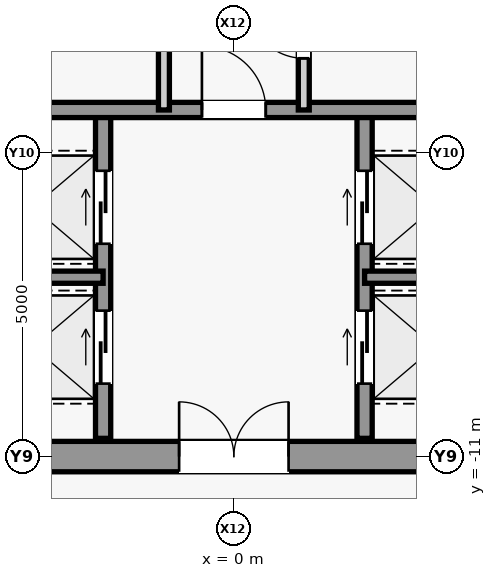
"""IFC4 building model, lengths in metres.
Left out: names, types, materials, properties, quantities, classifications, styles, units other than length and angle.
Written with IfcOpenShell. Run it as: python <this file> out.ifc"""

import sys

from ifc_helpers import new_model, si_unit, direction, frame, frame_2d, origin, place, context, subcontext, project, spatial, rectangle, extrude, source, transform, mapped, element, fill, save


model = new_model("IFC4")
c1 = context("Model", 3, precision=1e-05, world=origin(), true_north=direction((0.0, 1.0)))
c2 = subcontext(c1, "Body", "Model", "MODEL_VIEW")
j1 = project(units=[si_unit("LENGTHUNIT", "METRE"), si_unit("PLANEANGLEUNIT", "RADIAN")], contexts=[c1])
p1 = place(None, origin())
s1 = spatial("IfcSite", under=j1, at=p1, CompositionType="ELEMENT")
p2 = place(p1, origin())
s2 = spatial("IfcBuilding", under=s1, at=p2, CompositionType="ELEMENT")
p3 = place(p2, frame((0.0, 0.0, 116.0)))
s3 = spatial("IfcBuildingStorey", under=s2, at=p3, CompositionType="ELEMENT", Elevation=116.0)
m1 = source(origin(), c2, "Body", "SweptSolid", [
    extrude(rectangle(XDim=9.2, YDim=0.5, at=frame_2d((4.6, 0.0))), origin(), (0.0, 0.0, 1.0), 3.84),
])
p4 = place(p3, frame((-4.6, -11.0, 0.0), z_axis=(0.0, 0.0, 1.0), x_axis=(1.0, 0.0, 0.0)))
e1 = element("IfcWall", 1, at=p4, inside=s3, PredefinedType="SHEAR", context=c2, shape_type="MappedRepresentation", body=[
    mapped(m1, transform((0.0, 0.0, 0.0), scale=1.0)),
])
m2 = source(origin(), c2, "Body", "SweptSolid", [
    extrude(rectangle(XDim=1.8, YDim=2.25, at=frame_2d((0.9, 1.125))), frame((0.0, 0.26, 0.0), z_axis=(0.0, -1.0, 0.0), x_axis=(1.0, 0.0, 0.0)), (0.0, 0.0, 1.0), 0.52),
])
p5 = place(p4, frame((3.7, 0.0, 0.0)))
e2 = element("IfcOpeningElement", 2, at=p5, cuts=e1, PredefinedType="OPENING", context=c2, shape_type="MappedRepresentation", body=[
    mapped(m2, transform((0.0, 0.0, 0.0), scale=1.0)),
])
m3 = source(origin(), c2, "Body", "SweptSolid", [
    extrude(rectangle(XDim=5.4, YDim=0.25, at=frame_2d((2.7, 0.0))), origin(), (0.0, 0.0, 1.0), 3.84),
])
p6 = place(p3, frame((-2.15, -10.7, 0.0), z_axis=(0.0, 0.0, 1.0), x_axis=(0.0, 1.0, 0.0)))
e3 = element("IfcWall", 3, at=p6, inside=s3, PredefinedType="SHEAR", context=c2, shape_type="MappedRepresentation", body=[
    mapped(m3, transform((0.0, 0.0, 0.0), scale=1.0)),
])
m4 = source(origin(), c2, "Body", "SweptSolid", [
    extrude(rectangle(XDim=1.2, YDim=2.3, at=frame_2d((0.6, 1.15))), frame((0.0, 0.135, 0.0), z_axis=(0.0, -1.0, 0.0), x_axis=(1.0, 0.0, 0.0)), (0.0, 0.0, 1.0), 0.27),
])
p7 = place(p6, frame((0.9, 0.0, 0.0)))
e4 = element("IfcOpeningElement", 4, at=p7, cuts=e3, PredefinedType="OPENING", context=c2, shape_type="MappedRepresentation", body=[
    mapped(m4, transform((0.0, 0.0, 0.0), scale=1.0)),
])
p8 = place(p6, frame((3.2, 0.0, 0.0)))
e5 = element("IfcOpeningElement", 5, at=p8, cuts=e3, PredefinedType="OPENING", context=c2, shape_type="MappedRepresentation", body=[
    mapped(m4, transform((0.0, 0.0, 0.0), scale=1.0)),
])
p9 = place(p3, frame((2.15, -10.7, 0.0), z_axis=(0.0, 0.0, 1.0), x_axis=(0.0, 1.0, 0.0)))
e6 = element("IfcWall", 6, at=p9, inside=s3, PredefinedType="SHEAR", context=c2, shape_type="MappedRepresentation", body=[
    mapped(m3, transform((0.0, 0.0, 0.0), scale=1.0)),
])
p10 = place(p9, frame((0.9, 0.0, 0.0)))
e7 = element("IfcOpeningElement", 7, at=p10, cuts=e6, PredefinedType="OPENING", context=c2, shape_type="MappedRepresentation", body=[
    mapped(m4, transform((0.0, 0.0, 0.0), scale=1.0)),
])
p11 = place(p9, frame((3.2, 0.0, 0.0)))
e8 = element("IfcOpeningElement", 8, at=p11, cuts=e6, PredefinedType="OPENING", context=c2, shape_type="MappedRepresentation", body=[
    mapped(m4, transform((0.0, 0.0, 0.0), scale=1.0)),
])
m5 = source(origin(), c2, "Body", "SweptSolid", [
    extrude(rectangle(XDim=2.45, YDim=0.2, at=frame_2d((1.225, 0.0))), origin(), (0.0, 0.0, 1.0), 3.84),
])
for number, where, z_axis, x_axis in (
    (9, (-4.6, -8.05, 0.0), (0.0, 0.0, 1.0), (1.0, 0.0, 0.0)),
    (10, (2.15, -8.05, 0.0), (0.0, 0.0, 1.0), (1.0, 0.0, 0.0)),
):
    element("IfcWall", number, at=place(p3, frame(where, z_axis=z_axis, x_axis=x_axis)), inside=s3, PredefinedType="SHEAR", context=c2, shape_type="MappedRepresentation", body=[
        mapped(m5, transform((0.0, 0.0, 0.0), scale=1.0)),
    ])
m6 = source(origin(), c2, "Body", "SweptSolid", [
    extrude(rectangle(XDim=9.2, YDim=0.25, at=frame_2d((4.6, 0.0))), origin(), (0.0, 0.0, 1.0), 3.84),
])
p12 = place(p3, frame((-4.6, -5.3, 0.0), z_axis=(0.0, 0.0, 1.0), x_axis=(1.0, 0.0, 0.0)))
e11 = element("IfcWall", 11, at=p12, inside=s3, PredefinedType="SHEAR", context=c2, shape_type="MappedRepresentation", body=[
    mapped(m6, transform((0.0, 0.0, 0.0), scale=1.0)),
])
m7 = source(origin(), c2, "Body", "SweptSolid", [
    extrude(rectangle(XDim=1.05, YDim=2.2, at=frame_2d((0.525, 1.1))), frame((0.0, 0.135, 0.0), z_axis=(0.0, -1.0, 0.0), x_axis=(1.0, 0.0, 0.0)), (0.0, 0.0, 1.0), 0.27),
])
p13 = place(p12, frame((4.075, 0.0, 0.0)))
e12 = element("IfcOpeningElement", 12, at=p13, cuts=e11, PredefinedType="OPENING", context=c2, shape_type="MappedRepresentation", body=[
    mapped(m7, transform((0.0, 0.0, 0.0), scale=1.0)),
])
m8 = source(origin(), c2, "Body", "SweptSolid", [
    extrude(rectangle(XDim=10.6, YDim=0.18, at=frame_2d((5.3, 0.0))), origin(), (0.0, 0.0, 1.0), 3.84),
])
p14 = place(p3, frame((-1.15, -5.3, 0.0), z_axis=(0.0, 0.0, 1.0), x_axis=(0.0, 1.0, 0.0)))
e13 = element("IfcWall", 13, at=p14, inside=s3, PredefinedType="PARTITIONING", context=c2, shape_type="MappedRepresentation", body=[
    mapped(m8, transform((0.0, 0.0, 0.0), scale=1.0)),
])
m9 = source(origin(), c2, "Body", "SweptSolid", [
    extrude(rectangle(XDim=0.9, YDim=2.15, at=frame_2d((0.45, 1.075))), frame((0.0, 0.1, 0.0), z_axis=(0.0, -1.0, 0.0), x_axis=(1.0, 0.0, 0.0)), (0.0, 0.0, 1.0), 0.2),
])
p15 = place(p14, frame((1.9, 0.0, 0.0)))
e14 = element("IfcOpeningElement", 14, at=p15, cuts=e13, PredefinedType="OPENING", context=c2, shape_type="MappedRepresentation", body=[
    mapped(m9, transform((0.0, 0.0, 0.0), scale=1.0)),
])
p16 = place(p14, frame((6.55, 0.0, 0.0)))
e15 = element("IfcOpeningElement", 15, at=p16, cuts=e13, PredefinedType="OPENING", context=c2, shape_type="MappedRepresentation", body=[
    mapped(m9, transform((0.0, 0.0, 0.0), scale=1.0)),
])
p17 = place(p14, frame((9.475, 0.0, 0.0)))
e16 = element("IfcOpeningElement", 16, at=p17, cuts=e13, PredefinedType="OPENING", context=c2, shape_type="MappedRepresentation", body=[
    mapped(m9, transform((0.0, 0.0, 0.0), scale=1.0)),
])
p18 = place(p3, frame((1.15, -5.3, 0.0), z_axis=(0.0, 0.0, 1.0), x_axis=(0.0, 1.0, 0.0)))
e17 = element("IfcWall", 17, at=p18, inside=s3, PredefinedType="PARTITIONING", context=c2, shape_type="MappedRepresentation", body=[
    mapped(m8, transform((0.0, 0.0, 0.0), scale=1.0)),
])
p19 = place(p18, frame((0.85, 0.0, 0.0)))
e18 = element("IfcOpeningElement", 18, at=p19, cuts=e17, PredefinedType="OPENING", context=c2, shape_type="MappedRepresentation", body=[
    mapped(m9, transform((0.0, 0.0, 0.0), scale=1.0)),
])
p20 = place(p18, frame((3.55, 0.0, 0.0)))
e19 = element("IfcOpeningElement", 19, at=p20, cuts=e17, PredefinedType="OPENING", context=c2, shape_type="MappedRepresentation", body=[
    mapped(m9, transform((0.0, 0.0, 0.0), scale=1.0)),
])
p21 = place(p18, frame((6.3, 0.0, 0.0)))
e20 = element("IfcOpeningElement", 20, at=p21, cuts=e17, PredefinedType="OPENING", context=c2, shape_type="MappedRepresentation", body=[
    mapped(m9, transform((0.0, 0.0, 0.0), scale=1.0)),
])
p22 = place(p18, frame((8.25, 0.0, 0.0)))
e21 = element("IfcOpeningElement", 21, at=p22, cuts=e17, PredefinedType="OPENING", context=c2, shape_type="MappedRepresentation", body=[
    mapped(m9, transform((0.0, 0.0, 0.0), scale=1.0)),
])
p23 = place(p18, frame((9.475, 0.0, 0.0)))
e22 = element("IfcOpeningElement", 22, at=p23, cuts=e17, PredefinedType="OPENING", context=c2, shape_type="MappedRepresentation", body=[
    mapped(m9, transform((0.0, 0.0, 0.0), scale=1.0)),
])
m10 = source(origin(), c2, "Body", "SweptSolid", [
    extrude(rectangle(XDim=1.05, YDim=2.2, at=frame_2d((0.525, 1.1))), frame((0.0, 0.025, 0.0), z_axis=(0.0, -1.0, 0.0), x_axis=(1.0, 0.0, 0.0)), (0.0, 0.0, 1.0), 0.05),
])
p24 = place(p13, origin())
e23 = element("IfcDoor", 23, at=p24, inside=s3, OperationType="SINGLE_SWING_LEFT", PredefinedType="DOOR", context=c2, shape_type="MappedRepresentation", body=[
    mapped(m10, transform((0.0, 0.0, 0.0), scale=1.0)),
])
fill(e12, e23)
m11 = source(origin(), c2, "Body", "SweptSolid", [
    extrude(rectangle(XDim=1.8, YDim=2.25, at=frame_2d((0.9, 1.125))), frame((0.0, 0.025, 0.0), z_axis=(0.0, -1.0, 0.0), x_axis=(1.0, 0.0, 0.0)), (0.0, 0.0, 1.0), 0.05),
])
p25 = place(p5, origin())
e24 = element("IfcDoor", 24, at=p25, inside=s3, OperationType="SINGLE_SWING_LEFT", PredefinedType="DOOR", context=c2, shape_type="MappedRepresentation", body=[
    mapped(m11, transform((0.0, 0.0, 0.0), scale=1.0)),
])
fill(e2, e24)
m12 = source(origin(), c2, "Body", "SweptSolid", [
    extrude(rectangle(XDim=0.9, YDim=2.15, at=frame_2d((0.45, 1.075))), frame((0.0, 0.025, 0.0), z_axis=(0.0, -1.0, 0.0), x_axis=(1.0, 0.0, 0.0)), (0.0, 0.0, 1.0), 0.05),
])
p26 = place(p19, origin())
e25 = element("IfcDoor", 25, at=p26, inside=s3, OperationType="SINGLE_SWING_RIGHT", PredefinedType="DOOR", context=c2, shape_type="MappedRepresentation", body=[
    mapped(m12, transform((0.0, 0.0, 0.0), scale=1.0)),
])
fill(e18, e25)
m13 = source(origin(), c2, "Body", "SweptSolid", [
    extrude(rectangle(XDim=1.2, YDim=2.3, at=frame_2d((0.6, 1.15))), frame((0.0, 0.025, 0.0), z_axis=(0.0, -1.0, 0.0), x_axis=(1.0, 0.0, 0.0)), (0.0, 0.0, 1.0), 0.05),
])
p27 = place(p7, origin())
e26 = element("IfcDoor", 26, at=p27, inside=s3, OperationType="SLIDING_TO_LEFT", PredefinedType="DOOR", context=c2, shape_type="MappedRepresentation", body=[
    mapped(m13, transform((0.0, 0.0, 0.0), scale=1.0)),
])
fill(e4, e26)
p28 = place(p10, origin())
e27 = element("IfcDoor", 27, at=p28, inside=s3, OperationType="SLIDING_TO_LEFT", PredefinedType="DOOR", context=c2, shape_type="MappedRepresentation", body=[
    mapped(m13, transform((0.0, 0.0, 0.0), scale=1.0)),
])
fill(e7, e27)
p29 = place(p8, origin())
e28 = element("IfcDoor", 28, at=p29, inside=s3, OperationType="SLIDING_TO_LEFT", PredefinedType="DOOR", context=c2, shape_type="MappedRepresentation", body=[
    mapped(m13, transform((0.0, 0.0, 0.0), scale=1.0)),
])
fill(e5, e28)
p30 = place(p11, origin())
e29 = element("IfcDoor", 29, at=p30, inside=s3, OperationType="SLIDING_TO_LEFT", PredefinedType="DOOR", context=c2, shape_type="MappedRepresentation", body=[
    mapped(m13, transform((0.0, 0.0, 0.0), scale=1.0)),
])
fill(e8, e29)
save(model, sys.argv[1])
